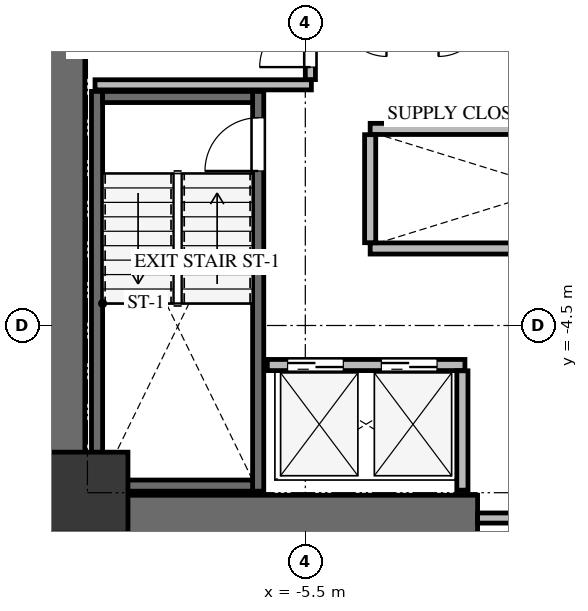
"""IFC4 building model, lengths in metres.
Left out: names, types, materials, properties, quantities, classifications, styles, units other than length and angle.
Written with IfcOpenShell. Run it as: python <this file> out.ifc"""

import sys

from ifc_helpers import new_model, si_unit, direction, frame, frame_2d, origin, origin_2d, place, context, subcontext, project, spatial, rectangle, extrude, source, transform, mapped, element, fill, save


model = new_model("IFC4")
c1 = context("Model", 3, precision=1e-05, world=origin(), true_north=direction((0.0, 1.0)))
c2 = subcontext(c1, "Body", "Model", "MODEL_VIEW")
j1 = project(units=[si_unit("LENGTHUNIT", "METRE"), si_unit("PLANEANGLEUNIT", "RADIAN")], contexts=[c1])
p1 = place(None, origin())
s1 = spatial("IfcSite", under=j1, at=p1, CompositionType="ELEMENT")
p2 = place(p1, origin())
s2 = spatial("IfcBuilding", under=s1, at=p2, CompositionType="ELEMENT")
p3 = place(p2, frame((0.0, 0.0, 39.0)))
s3 = spatial("IfcBuildingStorey", under=s2, at=p3, CompositionType="ELEMENT", Elevation=39.0)
p4 = place(p3, frame((-10.3, -8.75, 0.0), z_axis=(0.0, 0.0, 1.0), x_axis=(0.0, 1.0, 0.0)))
e1 = element("IfcWall", 1, at=p4, inside=s3, PredefinedType="SHEAR", context=c2, shape_type="SweptSolid", body=[
    extrude(rectangle(XDim=17.5, YDim=0.9, at=frame_2d((8.75, 0.0))), origin(), (0.0, 0.0, 1.0), 3.3),
])
p5 = place(p3, frame((-9.85, -8.3, 0.0), z_axis=(0.0, 0.0, 1.0), x_axis=(1.0, 0.0, 0.0)))
e2 = element("IfcWall", 2, at=p5, inside=s3, PredefinedType="SHEAR", context=c2, shape_type="SweptSolid", body=[
    extrude(rectangle(XDim=7.75, YDim=0.9, at=frame_2d((3.875, 0.0))), origin(), (0.0, 0.0, 1.0), 3.3),
])
p6 = place(p3, frame((-6.43, -7.77, -0.24), z_axis=(0.0, 0.0, 1.0), x_axis=(0.0, 1.0, 0.0)))
e3 = element("IfcWall", 3, at=p6, inside=s3, PredefinedType="SHEAR", context=c2, shape_type="SweptSolid", body=[
    extrude(rectangle(XDim=7.89, YDim=0.22, at=frame_2d((3.945, 0.0))), origin(), (0.0, 0.0, 1.0), 3.3),
])
p7 = place(p6, frame((6.32, 0.0, 0.0)))
e4 = element("IfcOpeningElement", 4, at=p7, cuts=e3, PredefinedType="OPENING", context=c2, shape_type="SweptSolid", body=[
    extrude(rectangle(XDim=1.05, YDim=2.15, at=frame_2d((0.525, 1.075))), frame((0.0, 0.12, 0.0), z_axis=(0.0, -1.0, 0.0), x_axis=(1.0, 0.0, 0.0)), (0.0, 0.0, 1.0), 0.24),
])
p8 = place(p3, frame((-9.61, 0.12, -0.24), z_axis=(0.0, 0.0, 1.0), x_axis=(0.0, -1.0, 0.0)))
e5 = element("IfcWall", 5, at=p8, inside=s3, PredefinedType="SHEAR", context=c2, shape_type="SweptSolid", body=[
    extrude(rectangle(XDim=7.89, YDim=0.22, at=frame_2d((3.945, 0.0))), origin(), (0.0, 0.0, 1.0), 3.3),
])
for number, where, z_axis, x_axis in (
    (6, (-9.5, -7.66, -0.24), (0.0, 0.0, 1.0), (1.0, 0.0, 0.0)),
    (7, (-6.54, 0.01, -0.24), (0.0, 0.0, 1.0), (-1.0, 0.0, 0.0)),
):
    element("IfcWall", number, at=place(p3, frame(where, z_axis=z_axis, x_axis=x_axis)), inside=s3, PredefinedType="SHEAR", context=c2, shape_type="SweptSolid", body=[
        extrude(rectangle(XDim=2.96, YDim=0.22, at=frame_2d((1.48, 0.0))), origin(), (0.0, 0.0, 1.0), 3.3),
    ])
m1 = source(origin(), c2, "Body", "SweptSolid", [
    extrude(rectangle(XDim=1.6, YDim=1.6, at=origin_2d()), origin(), (0.0, 0.0, 1.0), 3.3),
])
p9 = place(p3, frame((-9.8, -7.8, -0.24), z_axis=(0.0, 0.0, 1.0), x_axis=(1.0, 0.0, 0.0)))
e8 = element("IfcColumn", 8, at=p9, inside=s3, PredefinedType="COLUMN", context=c2, shape_type="MappedRepresentation", body=[
    mapped(m1, transform((0.0, 0.0, 0.0), x_axis=(1.0, 0.0, 0.0), y_axis=(0.0, 1.0, 0.0), z_axis=(0.0, 0.0, 1.0), scale=1.0)),
])
p10 = place(p3, frame((-2.1, -8.3, 0.0), z_axis=(0.0, 0.0, 1.0), x_axis=(1.0, 0.0, 0.0)))
e9 = element("IfcWall", 9, at=p10, inside=s3, PredefinedType="SOLIDWALL", context=c2, shape_type="SweptSolid", body=[
    extrude(rectangle(XDim=4.2, YDim=0.2, at=frame_2d((2.1, 0.0))), origin(), (0.0, 0.0, 1.0), 3.045),
])
p11 = place(p10, frame((1.2, 0.0, 0.0)))
e10 = element("IfcOpeningElement", 10, at=p11, cuts=e9, PredefinedType="OPENING", context=c2, shape_type="SweptSolid", body=[
    extrude(rectangle(XDim=1.8, YDim=2.15, at=frame_2d((0.9, 1.075))), frame((0.0, 0.11, 0.0), z_axis=(0.0, -1.0, 0.0), x_axis=(1.0, 0.0, 0.0)), (0.0, 0.0, 1.0), 0.22),
])
p12 = place(p3, frame((-9.65, 0.25, 0.0), z_axis=(0.0, 0.0, 1.0), x_axis=(1.0, 0.0, 0.0)))
e11 = element("IfcWall", 11, at=p12, inside=s3, PredefinedType="SOLIDWALL", context=c2, shape_type="SweptSolid", body=[
    extrude(rectangle(XDim=4.27, YDim=0.2, at=frame_2d((2.135, 0.0))), origin(), (0.0, 0.0, 1.0), 3.045),
])
p13 = place(p3, frame((-5.4, 0.354, 0.0), z_axis=(0.0, 0.0, 1.0), x_axis=(0.0, 1.0, 0.0)))
e12 = element("IfcWall", 12, at=p13, inside=s3, PredefinedType="SOLIDWALL", context=c2, shape_type="SweptSolid", body=[
    extrude(rectangle(XDim=4.026, YDim=0.2, at=frame_2d((2.013, 0.0))), origin(), (0.0, 0.0, 1.0), 3.045),
])
p14 = place(p13, frame((0.246, 0.0, 0.0)))
e13 = element("IfcOpeningElement", 13, at=p14, cuts=e12, PredefinedType="OPENING", context=c2, shape_type="SweptSolid", body=[
    extrude(rectangle(XDim=1.0, YDim=2.15, at=frame_2d((0.5, 1.075))), frame((0.0, 0.11, 0.0), z_axis=(0.0, -1.0, 0.0), x_axis=(1.0, 0.0, 0.0)), (0.0, 0.0, 1.0), 0.22),
])
p15 = place(p3, frame((-6.25, -5.28, 0.0), z_axis=(0.0, 0.0, 1.0), x_axis=(1.0, 0.0, 0.0)))
e14 = element("IfcWall", 14, at=p15, inside=s3, PredefinedType="SOLIDWALL", context=c2, shape_type="SweptSolid", body=[
    extrude(rectangle(XDim=3.9, YDim=0.22, at=frame_2d((1.95, 0.0))), origin(), (0.0, 0.0, 1.0), 3.045),
])
p16 = place(p15, frame((0.4, 0.0, 0.0)))
e15 = element("IfcOpeningElement", 15, at=p16, cuts=e14, PredefinedType="OPENING", context=c2, shape_type="SweptSolid", body=[
    extrude(rectangle(XDim=1.1, YDim=2.15, at=frame_2d((0.55, 1.075))), frame((0.0, 0.12, 0.0), z_axis=(0.0, -1.0, 0.0), x_axis=(1.0, 0.0, 0.0)), (0.0, 0.0, 1.0), 0.24),
])
p17 = place(p15, frame((2.25, 0.0, 0.0)))
e16 = element("IfcOpeningElement", 16, at=p17, cuts=e14, PredefinedType="OPENING", context=c2, shape_type="SweptSolid", body=[
    extrude(rectangle(XDim=1.1, YDim=2.15, at=frame_2d((0.55, 1.075))), frame((0.0, 0.12, 0.0), z_axis=(0.0, -1.0, 0.0), x_axis=(1.0, 0.0, 0.0)), (0.0, 0.0, 1.0), 0.24),
])
p18 = place(p3, frame((-2.4, -7.75, 0.0), z_axis=(0.0, 0.0, 1.0), x_axis=(0.0, 1.0, 0.0)))
e17 = element("IfcWall", 17, at=p18, inside=s3, PredefinedType="SOLIDWALL", context=c2, shape_type="SweptSolid", body=[
    extrude(rectangle(XDim=2.356, YDim=0.22, at=frame_2d((1.178, 0.0))), origin(), (0.0, 0.0, 1.0), 3.045),
])
for number, where, z_axis, x_axis in (
    (18, (-4.22, -2.98, 0.0), (0.0, 0.0, 1.0), (1.0, 0.0, 0.0)),
    (19, (-4.22, -0.62, 0.0), (0.0, 0.0, 1.0), (1.0, 0.0, 0.0)),
):
    element("IfcWall", number, at=place(p3, frame(where, z_axis=z_axis, x_axis=x_axis)), inside=s3, PredefinedType="SOLIDWALL", context=c2, shape_type="SweptSolid", body=[
        extrude(rectangle(XDim=7.24, YDim=0.22, at=frame_2d((3.62, 0.0))), origin(), (0.0, 0.0, 1.0), 3.045),
    ])
p19 = place(p3, frame((-4.22, -2.866, 0.0), z_axis=(0.0, 0.0, 1.0), x_axis=(0.0, 1.0, 0.0)))
e20 = element("IfcWall", 20, at=p19, inside=s3, PredefinedType="SOLIDWALL", context=c2, shape_type="SweptSolid", body=[
    extrude(rectangle(XDim=2.132, YDim=0.22, at=frame_2d((1.066, 0.0))), origin(), (0.0, 0.0, 1.0), 3.045),
])
m2 = source(origin(), c2, "Body", "SweptSolid", [
    extrude(rectangle(XDim=1.05, YDim=2.15, at=frame_2d((0.525, 1.075))), frame((0.0, 0.025, 0.0), z_axis=(0.0, -1.0, 0.0), x_axis=(1.0, 0.0, 0.0)), (0.0, 0.0, 1.0), 0.05),
])
p20 = place(p7, origin())
e21 = element("IfcDoor", 21, at=p20, inside=s3, OperationType="SINGLE_SWING_LEFT", PredefinedType="DOOR", context=c2, shape_type="MappedRepresentation", body=[
    mapped(m2, transform((0.0, 0.0, 0.0), x_axis=(1.0, 0.0, 0.0), y_axis=(0.0, 1.0, 0.0), z_axis=(0.0, 0.0, 1.0), scale=1.0)),
])
fill(e4, e21)
m3 = source(origin(), c2, "Body", "SweptSolid", [
    extrude(rectangle(XDim=1.0, YDim=2.15, at=frame_2d((0.5, 1.075))), frame((0.0, 0.025, 0.0), z_axis=(0.0, -1.0, 0.0), x_axis=(1.0, 0.0, 0.0)), (0.0, 0.0, 1.0), 0.05),
])
p21 = place(p14, origin())
e22 = element("IfcDoor", 22, at=p21, inside=s3, OperationType="SINGLE_SWING_LEFT", PredefinedType="DOOR", context=c2, shape_type="MappedRepresentation", body=[
    mapped(m3, transform((0.0, 0.0, 0.0), x_axis=(1.0, 0.0, 0.0), y_axis=(0.0, 1.0, 0.0), z_axis=(0.0, 0.0, 1.0), scale=1.0)),
])
fill(e13, e22)
m4 = source(origin(), c2, "Body", "SweptSolid", [
    extrude(rectangle(XDim=1.1, YDim=2.15, at=frame_2d((0.55, 1.075))), frame((0.0, 0.025, 0.0), z_axis=(0.0, -1.0, 0.0), x_axis=(1.0, 0.0, 0.0)), (0.0, 0.0, 1.0), 0.05),
])
p22 = place(p16, origin())
e23 = element("IfcDoor", 23, at=p22, inside=s3, OperationType="DOUBLE_DOOR_SLIDING", PredefinedType="DOOR", context=c2, shape_type="MappedRepresentation", body=[
    mapped(m4, transform((0.0, 0.0, 0.0), x_axis=(1.0, 0.0, 0.0), y_axis=(0.0, 1.0, 0.0), z_axis=(0.0, 0.0, 1.0), scale=1.0)),
])
fill(e15, e23)
p23 = place(p17, origin())
e24 = element("IfcDoor", 24, at=p23, inside=s3, OperationType="DOUBLE_DOOR_SLIDING", PredefinedType="DOOR", context=c2, shape_type="MappedRepresentation", body=[
    mapped(m4, transform((0.0, 0.0, 0.0), x_axis=(1.0, 0.0, 0.0), y_axis=(0.0, 1.0, 0.0), z_axis=(0.0, 0.0, 1.0), scale=1.0)),
])
fill(e16, e24)
save(model, sys.argv[1])
